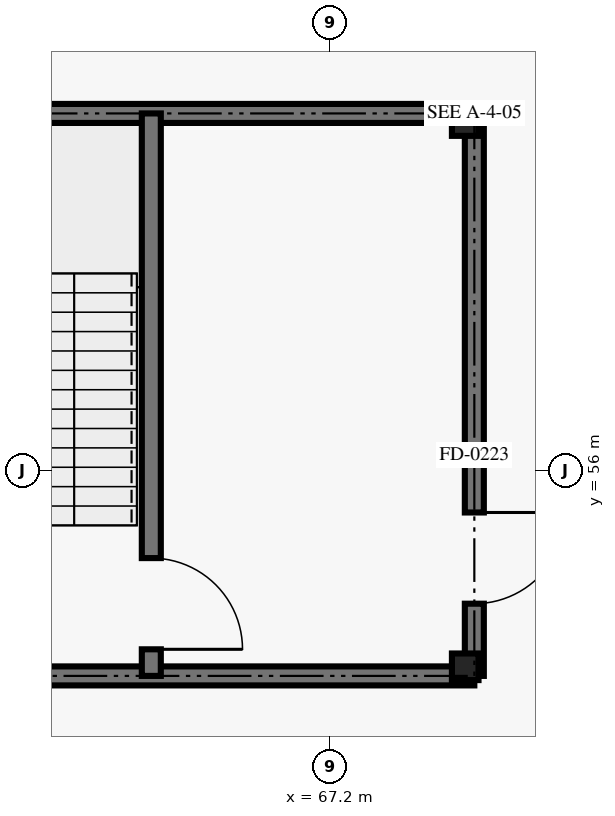
"""IFC4 building model, lengths in metres.
Left out: names, types, materials, properties, quantities, classifications, styles, units other than length and angle.
Written with IfcOpenShell. Run it as: python <this file> out.ifc"""

import sys

from ifc_helpers import new_model, si_unit, direction, frame, frame_2d, origin, origin_2d, place, context, subcontext, project, spatial, rectangle, i_section, extrude, element, fill, save


model = new_model("IFC4")
c1 = context("Model", 3, precision=1e-05, world=origin(), true_north=direction((0.0, 1.0)))
c2 = subcontext(c1, "Body", "Model", "MODEL_VIEW")
j1 = project(units=[si_unit("LENGTHUNIT", "METRE"), si_unit("PLANEANGLEUNIT", "RADIAN")], contexts=[c1])
p1 = place(None, origin())
s1 = spatial("IfcSite", under=j1, at=p1, CompositionType="ELEMENT")
p2 = place(p1, origin())
s2 = spatial("IfcBuilding", under=s1, at=p2, CompositionType="ELEMENT")
p3 = place(p2, frame((0.0, 0.0, -4.5)))
s3 = spatial("IfcBuildingStorey", under=s2, at=p3, CompositionType="ELEMENT", Elevation=-4.5)
for number, where, z_axis, x_axis in (
    (1, (68.98, 53.42, 0.0), (0.0, 0.0, 1.0), (1.0, 0.0, 0.0)),
    (2, (68.98, 60.58, 0.0), (0.0, 0.0, 1.0), (1.0, 0.0, 0.0)),
):
    element("IfcColumn", number, at=place(p3, frame(where, z_axis=z_axis, x_axis=x_axis)), inside=s3, PredefinedType="COLUMN", context=c2, shape_type="SweptSolid", body=[
        extrude(i_section(OverallWidth=0.35, OverallDepth=0.35, WebThickness=0.02, FlangeThickness=0.028, at=origin_2d()), origin(), (0.0, 0.0, 1.0), 4.5),
    ])
for number, where, z_axis, x_axis in (
    (3, (59.9, 60.7, 0.0), (0.0, 0.0, 1.0), (1.0, 0.0, 0.0)),
    (4, (69.1, 53.3, 0.0), (0.0, 0.0, 1.0), (-1.0, 0.0, 0.0)),
):
    element("IfcWall", number, at=place(p3, frame(where, z_axis=z_axis, x_axis=x_axis)), inside=s3, PredefinedType="SHEAR", context=c2, shape_type="SweptSolid", body=[
        extrude(rectangle(XDim=9.2, YDim=0.25, at=frame_2d((4.6, 0.0))), origin(), (0.0, 0.0, 1.0), 4.14),
    ])
p4 = place(p3, frame((69.1, 60.7, 0.0), z_axis=(0.0, 0.0, 1.0), x_axis=(0.0, -1.0, 0.0)))
e5 = element("IfcWall", 5, at=p4, inside=s3, PredefinedType="SHEAR", context=c2, shape_type="SweptSolid", body=[
    extrude(rectangle(XDim=7.4, YDim=0.25, at=frame_2d((3.7, 0.0))), origin(), (0.0, 0.0, 1.0), 4.14),
])
p5 = place(p4, frame((5.25, 0.0, 0.0)))
e6 = element("IfcOpeningElement", 6, at=p5, cuts=e5, PredefinedType="OPENING", context=c2, shape_type="SweptSolid", body=[
    extrude(rectangle(XDim=1.2, YDim=2.2, at=frame_2d((0.6, 1.1))), frame((0.0, 0.135, 0.0), z_axis=(0.0, -1.0, 0.0), x_axis=(1.0, 0.0, 0.0)), (0.0, 0.0, 1.0), 0.27),
])
p6 = place(p3, frame((64.85, 60.7, 0.0), z_axis=(0.0, 0.0, 1.0), x_axis=(0.0, -1.0, 0.0)))
e7 = element("IfcWall", 7, at=p6, inside=s3, PredefinedType="SHEAR", context=c2, shape_type="SweptSolid", body=[
    extrude(rectangle(XDim=7.4, YDim=0.25, at=frame_2d((3.7, 0.0))), origin(), (0.0, 0.0, 1.0), 4.14),
])
p7 = place(p6, frame((5.85, 0.0, 0.0)))
e8 = element("IfcOpeningElement", 8, at=p7, cuts=e7, PredefinedType="OPENING", context=c2, shape_type="SweptSolid", body=[
    extrude(rectangle(XDim=1.2, YDim=2.2, at=frame_2d((0.6, 1.1))), frame((0.0, 0.135, 0.0), z_axis=(0.0, -1.0, 0.0), x_axis=(1.0, 0.0, 0.0)), (0.0, 0.0, 1.0), 0.27),
])
p8 = place(p5, origin())
e9 = element("IfcDoor", 9, at=p8, inside=s3, OperationType="SINGLE_SWING_LEFT", PredefinedType="DOOR", context=c2, shape_type="SweptSolid", body=[
    extrude(rectangle(XDim=1.2, YDim=2.2, at=frame_2d((0.6, 1.1))), frame((0.0, 0.025, 0.0), z_axis=(0.0, -1.0, 0.0), x_axis=(1.0, 0.0, 0.0)), (0.0, 0.0, 1.0), 0.05),
])
fill(e6, e9)
p9 = place(p7, origin())
e10 = element("IfcDoor", 10, at=p9, inside=s3, OperationType="SINGLE_SWING_RIGHT", PredefinedType="DOOR", context=c2, shape_type="SweptSolid", body=[
    extrude(rectangle(XDim=1.2, YDim=2.2, at=frame_2d((0.6, 1.1))), frame((0.0, 0.025, 0.0), z_axis=(0.0, -1.0, 0.0), x_axis=(1.0, 0.0, 0.0)), (0.0, 0.0, 1.0), 0.05),
])
fill(e8, e10)
save(model, sys.argv[1])
